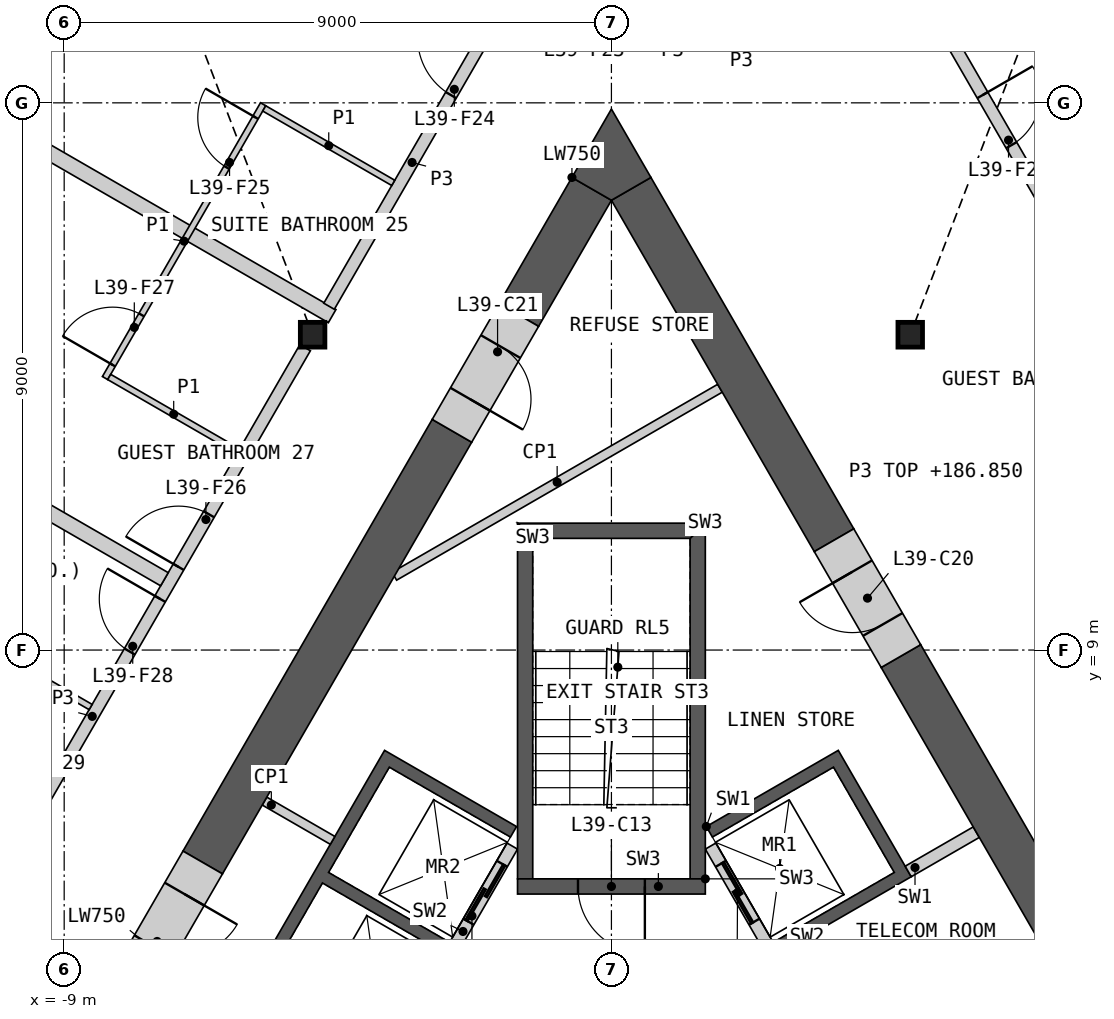
"""IFC4 building model, lengths in metres.
Left out: names, types, materials, properties, quantities, classifications, styles, units other than length and angle.
Written with IfcOpenShell. Run it as: python <this file> out.ifc"""

import sys

from ifc_helpers import new_model, si_unit, direction, frame, frame_2d, origin, origin_2d, place, context, subcontext, project, spatial, polyline, rectangle, i_section, outline, extrude, element, fill, save


model = new_model("IFC4")
c1 = context("Model", 3, precision=1e-05, world=origin(), true_north=direction((0.0, 1.0)))
c2 = subcontext(c1, "Body", "Model", "MODEL_VIEW")
j1 = project(units=[si_unit("LENGTHUNIT", "METRE"), si_unit("PLANEANGLEUNIT", "RADIAN")], contexts=[c1])
p1 = place(None, origin())
s1 = spatial("IfcSite", under=j1, at=p1, CompositionType="ELEMENT")
p2 = place(p1, origin())
s2 = spatial("IfcBuilding", under=s1, at=p2, CompositionType="ELEMENT")
p3 = place(p2, frame((0.0, 0.0, 183.6)))
s3 = spatial("IfcBuildingStorey", under=s2, at=p3, CompositionType="ELEMENT", Elevation=183.6)
for number, where, z_axis, x_axis in (
    (1, (-4.914, 14.186, 0.0), (0.0, 0.0, 1.0), (1.0, 0.0, 0.0)),
    (2, (4.914, 14.186, 0.0), (0.0, 0.0, 1.0), (1.0, 0.0, 0.0)),
):
    element("IfcColumn", number, at=place(p3, frame(where, z_axis=z_axis, x_axis=x_axis)), inside=s3, PredefinedType="COLUMN", context=c2, shape_type="SweptSolid", body=[
        extrude(i_section(OverallWidth=0.404, OverallDepth=0.407, WebThickness=0.027, FlangeThickness=0.044, at=origin_2d()), origin(), (0.0, 0.0, 1.0), 3.6),
    ])
p4 = place(p3, origin())
e3 = element("IfcWall", 3, at=p4, inside=s3, PredefinedType="SHEAR", context=c2, shape_type="SweptSolid", body=[
    extrude(outline(polyline([(1.561, 6.097), (3.731, 7.35), (4.931, 5.272), (2.76, 4.019), (2.66, 4.192), (4.652, 5.342), (3.652, 7.074), (1.66, 5.924), (1.561, 6.097)])), origin(), (0.0, 0.0, 1.0), 3.25),
])
p5 = place(p3, frame((5.817, -1.476, 0.0), z_axis=(0.0, 0.0, 1.0), x_axis=(-0.500002616675, 0.866023893041, 0.0)))
e4 = element("IfcWall", 4, at=p5, inside=s3, PredefinedType="SOLIDWALL", context=c2, shape_type="SweptSolid", body=[
    extrude(rectangle(XDim=8.373, YDim=0.2, at=frame_2d((4.187, 0.0))), origin(), (0.0, 0.0, 1.0), 3.25),
])
p6 = place(p5, frame((1.537, 0.0, 0.0)))
e5 = element("IfcOpeningElement", 5, at=p6, cuts=e4, PredefinedType="OPENING", context=c2, shape_type="SweptSolid", body=[
    extrude(rectangle(XDim=0.9, YDim=2.1, at=frame_2d((0.45, 1.05))), frame((0.0, 0.11, 0.0), z_axis=(0.0, -1.0, 0.0), x_axis=(1.0, 0.0, 0.0)), (0.0, 0.0, 1.0), 0.22),
])
p7 = place(p5, frame((4.837, 0.0, 0.0)))
e6 = element("IfcOpeningElement", 6, at=p7, cuts=e4, PredefinedType="OPENING", context=c2, shape_type="SweptSolid", body=[
    extrude(rectangle(XDim=0.9, YDim=2.1, at=frame_2d((0.45, 1.05))), frame((0.0, 0.11, 0.0), z_axis=(0.0, -1.0, 0.0), x_axis=(1.0, 0.0, 0.0)), (0.0, 0.0, 1.0), 0.22),
])
p8 = place(p5, frame((6.937, 0.0, 0.0)))
e7 = element("IfcOpeningElement", 7, at=p8, cuts=e4, PredefinedType="OPENING", context=c2, shape_type="SweptSolid", body=[
    extrude(rectangle(XDim=1.1, YDim=2.1, at=frame_2d((0.55, 1.05))), frame((0.0, 0.11, 0.0), z_axis=(0.0, -1.0, 0.0), x_axis=(1.0, 0.0, 0.0)), (0.0, 0.0, 1.0), 0.22),
])
p9 = place(p3, frame((4.881, 5.358, 0.0), z_axis=(0.0, 0.0, 1.0), x_axis=(0.866084958089, 0.499896834728, 0.0)))
e8 = element("IfcWall", 8, at=p9, inside=s3, PredefinedType="SHEAR", context=c2, shape_type="SweptSolid", body=[
    extrude(rectangle(XDim=1.293, YDim=0.2, at=frame_2d((0.646, 0.0))), origin(), (0.0, 0.0, 1.0), 3.25),
])
p10 = place(p3, origin())
e9 = element("IfcWall", 9, at=p10, inside=s3, PredefinedType="SHEAR", context=c2, shape_type="SweptSolid", body=[
    extrude(outline(polyline([(-4.96, 0.208), (-7.131, 1.461), (-3.731, 7.35), (-1.561, 6.097), (-1.66, 5.924), (-3.652, 7.074), (-4.652, 5.342), (-2.66, 4.192), (-2.76, 4.019), (-4.752, 5.169), (-5.752, 3.437), (-3.76, 2.287), (-3.861, 2.113), (-5.852, 3.263), (-6.852, 1.531), (-4.861, 0.381), (-4.96, 0.208)])), origin(), (0.0, 0.0, 1.0), 3.25),
])
p11 = place(p3, frame((-1.631, 5.776, 0.0), z_axis=(0.0, 0.0, 1.0), x_axis=(-0.499992876559, -0.866029516466, 0.0)))
e10 = element("IfcWall", 10, at=p11, inside=s3, PredefinedType="SOLIDWALL", context=c2, shape_type="SweptSolid", body=[
    extrude(rectangle(XDim=6.486, YDim=0.2, at=frame_2d((3.243, 0.0))), origin(), (0.0, 0.0, 1.0), 3.25),
])
p12 = place(p11, frame((0.337, 0.0, 0.0)))
e11 = element("IfcOpeningElement", 11, at=p12, cuts=e10, PredefinedType="OPENING", context=c2, shape_type="SweptSolid", body=[
    extrude(rectangle(XDim=1.1, YDim=2.1, at=frame_2d((0.55, 1.05))), frame((0.0, 0.11, 0.0), z_axis=(0.0, -1.0, 0.0), x_axis=(1.0, 0.0, 0.0)), (0.0, 0.0, 1.0), 0.22),
])
p13 = place(p11, frame((2.537, 0.0, 0.0)))
e12 = element("IfcOpeningElement", 12, at=p13, cuts=e10, PredefinedType="OPENING", context=c2, shape_type="SweptSolid", body=[
    extrude(rectangle(XDim=1.1, YDim=2.1, at=frame_2d((0.55, 1.05))), frame((0.0, 0.11, 0.0), z_axis=(0.0, -1.0, 0.0), x_axis=(1.0, 0.0, 0.0)), (0.0, 0.0, 1.0), 0.22),
])
p14 = place(p3, origin())
e13 = element("IfcWall", 13, at=p14, inside=s3, PredefinedType="SHEAR", context=c2, shape_type="SweptSolid", body=[
    extrude(outline(polyline([(1.544, 5.237), (1.544, 11.087), (1.294, 10.837), (1.294, 5.237), (1.544, 5.237)])), origin(), (0.0, 0.0, 1.0), 3.25),
])
p15 = place(p3, origin())
e14 = element("IfcWall", 14, at=p15, inside=s3, PredefinedType="SHEAR", context=c2, shape_type="SweptSolid", body=[
    extrude(outline(polyline([(1.544, 11.087), (-1.544, 11.087), (-1.294, 10.837), (1.294, 10.837), (1.544, 11.087)])), origin(), (0.0, 0.0, 1.0), 3.25),
])
p16 = place(p3, origin())
e15 = element("IfcWall", 15, at=p16, inside=s3, PredefinedType="SHEAR", context=c2, shape_type="SweptSolid", body=[
    extrude(outline(polyline([(-1.294, 10.837), (-1.544, 11.087), (-1.544, 5.237), (-1.294, 5.237), (-1.294, 10.837)])), origin(), (0.0, 0.0, 1.0), 3.25),
])
p17 = place(p3, frame((1.544, 5.112, 0.0), z_axis=(0.0, 0.0, 1.0), x_axis=(-1.0, 0.0, 0.0)))
e16 = element("IfcWall", 16, at=p17, inside=s3, PredefinedType="SHEAR", context=c2, shape_type="SweptSolid", body=[
    extrude(rectangle(XDim=3.088, YDim=0.25, at=frame_2d((1.544, 0.0))), origin(), (0.0, 0.0, 1.0), 3.25),
])
p18 = place(p17, frame((0.994, 0.0, 0.0)))
e17 = element("IfcOpeningElement", 17, at=p18, cuts=e16, PredefinedType="OPENING", context=c2, shape_type="SweptSolid", body=[
    extrude(rectangle(XDim=1.1, YDim=2.1, at=frame_2d((0.55, 1.05))), frame((0.0, 0.135, 0.0), z_axis=(0.0, -1.0, 0.0), x_axis=(1.0, 0.0, 0.0)), (0.0, 0.0, 1.0), 0.27),
])
p19 = place(p3, frame((-5.705, 6.516, 0.0), z_axis=(0.0, 0.0, 1.0), x_axis=(0.866003189247, -0.500038474733, 0.0)))
e18 = element("IfcWall", 18, at=p19, inside=s3, PredefinedType="PARTITIONING", context=c2, shape_type="SweptSolid", body=[
    extrude(rectangle(XDim=1.293, YDim=0.15, at=frame_2d((0.646, 0.0))), origin(), (0.0, 0.0, 1.0), 3.25),
])
p20 = place(p3, frame((1.785, 13.306, 0.0), z_axis=(0.0, 0.0, 1.0), x_axis=(-0.866038319186, -0.499977629202, 0.0)))
e19 = element("IfcWall", 19, at=p20, inside=s3, PredefinedType="PARTITIONING", context=c2, shape_type="SweptSolid", body=[
    extrude(rectangle(XDim=6.184, YDim=0.15, at=frame_2d((3.092, 0.0))), origin(), (0.0, 0.0, 1.0), 3.25),
])
p21 = place(p3, frame((3.661, 10.806, 0.0), z_axis=(0.0, 0.0, 1.0), x_axis=(-0.500014865866, 0.866016820803, 0.0)))
e20 = element("IfcWall", 20, at=p21, inside=s3, PredefinedType="SHEAR", context=c2, shape_type="SweptSolid", body=[
    extrude(rectangle(XDim=6.673, YDim=0.75, at=frame_2d((3.336, 0.0))), origin(), (0.0, 0.0, 1.0), 3.25),
])
p22 = place(p3, frame((7.964, 3.354, 0.0), z_axis=(0.0, 0.0, 1.0), x_axis=(-0.50002928721, 0.866008494146, 0.0)))
e21 = element("IfcWall", 21, at=p22, inside=s3, PredefinedType="SHEAR", context=c2, shape_type="SweptSolid", body=[
    extrude(rectangle(XDim=6.405, YDim=0.75, at=frame_2d((3.203, 0.0))), origin(), (0.0, 0.0, 1.0), 3.25),
])
p23 = place(p3, frame((-2.622, 12.606, 0.0), z_axis=(0.0, 0.0, 1.0), x_axis=(-0.500014611105, -0.866016967894, 0.0)))
e22 = element("IfcWall", 22, at=p23, inside=s3, PredefinedType="SHEAR", context=c2, shape_type="SweptSolid", body=[
    extrude(rectangle(XDim=8.198, YDim=0.75, at=frame_2d((4.099, 0.0))), origin(), (0.0, 0.0, 1.0), 3.25),
])
p24 = place(p3, frame((-0.325, 16.585, 0.0), z_axis=(0.0, 0.0, 1.0), x_axis=(-0.500019473932, -0.866014160212, 0.0)))
e23 = element("IfcWall", 23, at=p24, inside=s3, PredefinedType="SHEAR", context=c2, shape_type="SweptSolid", body=[
    extrude(rectangle(XDim=2.396, YDim=0.75, at=frame_2d((1.198, 0.0))), origin(), (0.0, 0.0, 1.0), 3.25),
])
p25 = place(p3, origin())
e24 = element("IfcWall", 24, at=p25, inside=s3, PredefinedType="SHEAR", context=c2, shape_type="SweptSolid", body=[
    extrude(outline(polyline([(-0.649, 16.773), (0.0, 17.898), (0.649, 16.773), (0.0, 16.398), (-0.649, 16.773)])), origin(), (0.0, 0.0, 1.0), 3.25),
])
p26 = place(p3, frame((-6.721, 5.506, 0.0), z_axis=(0.0, 0.0, 1.0), x_axis=(-0.499946605688, -0.86605622881, 0.0)))
e25 = element("IfcWall", 25, at=p26, inside=s3, PredefinedType="SHEAR", context=c2, shape_type="SweptSolid", body=[
    extrude(rectangle(XDim=2.2, YDim=0.75, at=frame_2d((1.1, 0.0))), origin(), (0.0, 0.0, 1.0), 3.25),
])
p27 = place(p26, frame((0.6, 0.0, 0.0)))
e26 = element("IfcOpeningElement", 26, at=p27, cuts=e25, PredefinedType="OPENING", context=c2, shape_type="SweptSolid", body=[
    extrude(rectangle(XDim=1.0, YDim=2.1, at=frame_2d((0.5, 1.05))), frame((0.0, 0.385, 0.0), z_axis=(0.0, -1.0, 0.0), x_axis=(1.0, 0.0, 0.0)), (0.0, 0.0, 1.0), 0.77),
])
p28 = place(p3, frame((4.761, 8.901, 0.0), z_axis=(0.0, 0.0, 1.0), x_axis=(-0.499898558967, 0.866083962871, 0.0)))
e27 = element("IfcWall", 27, at=p28, inside=s3, PredefinedType="SHEAR", context=c2, shape_type="SweptSolid", body=[
    extrude(rectangle(XDim=2.2, YDim=0.75, at=frame_2d((1.1, 0.0))), origin(), (0.0, 0.0, 1.0), 3.25),
])
p29 = place(p28, frame((0.6, 0.0, 0.0)))
e28 = element("IfcOpeningElement", 28, at=p29, cuts=e27, PredefinedType="OPENING", context=c2, shape_type="SweptSolid", body=[
    extrude(rectangle(XDim=1.0, YDim=2.1, at=frame_2d((0.5, 1.05))), frame((0.0, 0.385, 0.0), z_axis=(0.0, -1.0, 0.0), x_axis=(1.0, 0.0, 0.0)), (0.0, 0.0, 1.0), 0.77),
])
p30 = place(p3, frame((-1.522, 14.511, 0.0), z_axis=(0.0, 0.0, 1.0), x_axis=(-0.499946605688, -0.86605622881, 0.0)))
e29 = element("IfcWall", 29, at=p30, inside=s3, PredefinedType="SHEAR", context=c2, shape_type="SweptSolid", body=[
    extrude(rectangle(XDim=2.2, YDim=0.75, at=frame_2d((1.1, 0.0))), origin(), (0.0, 0.0, 1.0), 3.25),
])
p31 = place(p30, frame((0.6, 0.0, 0.0)))
e30 = element("IfcOpeningElement", 30, at=p31, cuts=e29, PredefinedType="OPENING", context=c2, shape_type="SweptSolid", body=[
    extrude(rectangle(XDim=1.0, YDim=2.1, at=frame_2d((0.5, 1.05))), frame((0.0, 0.385, 0.0), z_axis=(0.0, -1.0, 0.0), x_axis=(1.0, 0.0, 0.0)), (0.0, 0.0, 1.0), 0.77),
])
p32 = place(p3, frame((5.377, 19.385, 0.0), z_axis=(0.0, 0.0, 1.0), x_axis=(0.500000757641, -0.86602496636, 0.0)))
e31 = element("IfcWall", 31, at=p32, inside=s3, PredefinedType="PARTITIONING", context=c2, shape_type="SweptSolid", body=[
    extrude(rectangle(XDim=28.198, YDim=0.2, at=frame_2d((14.099, 0.0))), origin(), (0.0, 0.0, 1.0), 3.25),
])
p33 = place(p32, frame((22.735, 0.0, 0.0)))
e32 = element("IfcOpeningElement", 32, at=p33, cuts=e31, PredefinedType="OPENING", context=c2, shape_type="SweptSolid", body=[
    extrude(rectangle(XDim=1.8, YDim=2.1, at=frame_2d((0.9, 1.05))), frame((0.0, 0.11, 0.0), z_axis=(0.0, -1.0, 0.0), x_axis=(1.0, 0.0, 0.0)), (0.0, 0.0, 1.0), 0.22),
])
p34 = place(p32, frame((14.402, 0.0, 0.0)))
e33 = element("IfcOpeningElement", 33, at=p34, cuts=e31, PredefinedType="OPENING", context=c2, shape_type="SweptSolid", body=[
    extrude(rectangle(XDim=1.0, YDim=2.1, at=frame_2d((0.5, 1.05))), frame((0.0, 0.11, 0.0), z_axis=(0.0, -1.0, 0.0), x_axis=(1.0, 0.0, 0.0)), (0.0, 0.0, 1.0), 0.22),
])
p35 = place(p32, frame((12.796, 0.0, 0.0)))
e34 = element("IfcOpeningElement", 34, at=p35, cuts=e31, PredefinedType="OPENING", context=c2, shape_type="SweptSolid", body=[
    extrude(rectangle(XDim=1.0, YDim=2.1, at=frame_2d((0.5, 1.05))), frame((0.0, 0.11, 0.0), z_axis=(0.0, -1.0, 0.0), x_axis=(1.0, 0.0, 0.0)), (0.0, 0.0, 1.0), 0.22),
])
p36 = place(p32, frame((4.164, 0.0, 0.0)))
e35 = element("IfcOpeningElement", 35, at=p36, cuts=e31, PredefinedType="OPENING", context=c2, shape_type="SweptSolid", body=[
    extrude(rectangle(XDim=1.0, YDim=2.1, at=frame_2d((0.5, 1.05))), frame((0.0, 0.11, 0.0), z_axis=(0.0, -1.0, 0.0), x_axis=(1.0, 0.0, 0.0)), (0.0, 0.0, 1.0), 0.22),
])
p37 = place(p32, frame((1.452, 0.0, 0.0)))
e36 = element("IfcOpeningElement", 36, at=p37, cuts=e31, PredefinedType="OPENING", context=c2, shape_type="SweptSolid", body=[
    extrude(rectangle(XDim=0.95, YDim=2.1, at=frame_2d((0.475, 1.05))), frame((0.0, 0.11, 0.0), z_axis=(0.0, -1.0, 0.0), x_axis=(1.0, 0.0, 0.0)), (0.0, 0.0, 1.0), 0.22),
])
p38 = place(p3, frame((-15.835, 20.983, 0.0), z_axis=(0.0, 0.0, 1.0), x_axis=(0.866022720283, -0.500004647933, 0.0)))
e37 = element("IfcWall", 37, at=p38, inside=s3, PredefinedType="PARTITIONING", context=c2, shape_type="SweptSolid", body=[
    extrude(rectangle(XDim=12.981, YDim=0.25, at=frame_2d((6.49, 0.0))), origin(), (0.0, 0.0, 1.0), 2.404),
])
p39 = place(p3, frame((-9.705, 5.888, 0.0), z_axis=(0.0, 0.0, 1.0), x_axis=(0.50000393355, 0.866023132736, 0.0)))
e38 = element("IfcWall", 38, at=p39, inside=s3, PredefinedType="PARTITIONING", context=c2, shape_type="SweptSolid", body=[
    extrude(rectangle(XDim=9.335, YDim=0.2, at=frame_2d((4.667, 0.0))), origin(), (0.0, 0.0, 1.0), 3.25),
])
p40 = place(p39, frame((5.172, 0.0, 0.0)))
e39 = element("IfcOpeningElement", 39, at=p40, cuts=e38, PredefinedType="OPENING", context=c2, shape_type="SweptSolid", body=[
    extrude(rectangle(XDim=1.0, YDim=2.1, at=frame_2d((0.5, 1.05))), frame((0.0, 0.11, 0.0), z_axis=(0.0, -1.0, 0.0), x_axis=(1.0, 0.0, 0.0)), (0.0, 0.0, 1.0), 0.22),
])
p41 = place(p39, frame((3.565, 0.0, 0.0)))
e40 = element("IfcOpeningElement", 40, at=p41, cuts=e38, PredefinedType="OPENING", context=c2, shape_type="SweptSolid", body=[
    extrude(rectangle(XDim=1.0, YDim=2.1, at=frame_2d((0.5, 1.05))), frame((0.0, 0.11, 0.0), z_axis=(0.0, -1.0, 0.0), x_axis=(1.0, 0.0, 0.0)), (0.0, 0.0, 1.0), 0.22),
])
p42 = place(p3, frame((-14.39, 14.228, 0.0), z_axis=(0.0, 0.0, 1.0), x_axis=(0.866031008936, -0.499990291468, 0.0)))
e41 = element("IfcWall", 41, at=p42, inside=s3, PredefinedType="PARTITIONING", context=c2, shape_type="SweptSolid", body=[
    extrude(rectangle(XDim=8.127, YDim=0.25, at=frame_2d((4.063, 0.0))), origin(), (0.0, 0.0, 1.0), 2.404),
])
p43 = place(p3, frame((-4.644, 14.655, 0.0), z_axis=(0.0, 0.0, 1.0), x_axis=(0.49998041698, 0.866036709751, 0.0)))
e42 = element("IfcWall", 42, at=p43, inside=s3, PredefinedType="PARTITIONING", context=c2, shape_type="SweptSolid", body=[
    extrude(rectangle(XDim=5.462, YDim=0.2, at=frame_2d((2.731, 0.0))), origin(), (0.0, 0.0, 1.0), 3.25),
])
p44 = place(p43, frame((4.01, 0.0, 0.0)))
e43 = element("IfcOpeningElement", 43, at=p44, cuts=e42, PredefinedType="OPENING", context=c2, shape_type="SweptSolid", body=[
    extrude(rectangle(XDim=1.1, YDim=2.1, at=frame_2d((0.55, 1.05))), frame((0.0, 0.11, 0.0), z_axis=(0.0, -1.0, 0.0), x_axis=(1.0, 0.0, 0.0)), (0.0, 0.0, 1.0), 0.22),
])
p45 = place(p3, frame((-8.328, 13.473, 0.0), z_axis=(0.0, 0.0, 1.0), x_axis=(0.499992051641, 0.866029992723, 0.0)))
e44 = element("IfcWall", 44, at=p45, inside=s3, PredefinedType="PARTITIONING", context=c2, shape_type="SweptSolid", body=[
    extrude(rectangle(XDim=5.2, YDim=0.1, at=frame_2d((2.6, 0.0))), origin(), (0.0, 0.0, 1.0), 2.404),
])
p46 = place(p45, frame((4.0, 0.0, 0.0)))
e45 = element("IfcOpeningElement", 45, at=p46, cuts=e44, PredefinedType="OPENING", context=c2, shape_type="SweptSolid", body=[
    extrude(rectangle(XDim=0.95, YDim=2.1, at=frame_2d((0.475, 1.05))), frame((0.0, 0.06, 0.0), z_axis=(0.0, -1.0, 0.0), x_axis=(1.0, 0.0, 0.0)), (0.0, 0.0, 1.0), 0.12),
])
p47 = place(p45, frame((0.25, 0.0, 0.0)))
e46 = element("IfcOpeningElement", 46, at=p47, cuts=e44, PredefinedType="OPENING", context=c2, shape_type="SweptSolid", body=[
    extrude(rectangle(XDim=0.95, YDim=2.1, at=frame_2d((0.475, 1.05))), frame((0.0, 0.06, 0.0), z_axis=(0.0, -1.0, 0.0), x_axis=(1.0, 0.0, 0.0)), (0.0, 0.0, 1.0), 0.12),
])
p48 = place(p3, frame((-5.71, 17.908, 0.0), z_axis=(0.0, 0.0, 1.0), x_axis=(0.866057815567, -0.499943856944, 0.0)))
e47 = element("IfcWall", 47, at=p48, inside=s3, PredefinedType="PARTITIONING", context=c2, shape_type="SweptSolid", body=[
    extrude(rectangle(XDim=2.45, YDim=0.1, at=frame_2d((1.225, 0.0))), origin(), (0.0, 0.0, 1.0), 2.404),
])
p49 = place(p3, frame((-8.26, 13.492, 0.0), z_axis=(0.0, 0.0, 1.0), x_axis=(0.866014668023, -0.500018594424, 0.0)))
e48 = element("IfcWall", 48, at=p49, inside=s3, PredefinedType="PARTITIONING", context=c2, shape_type="SweptSolid", body=[
    extrude(rectangle(XDim=2.45, YDim=0.1, at=frame_2d((1.225, 0.0))), origin(), (0.0, 0.0, 1.0), 2.404),
])
p50 = place(p3, frame((-10.687, 9.288, 0.0), z_axis=(0.0, 0.0, 1.0), x_axis=(0.866032905446, -0.499987006516, 0.0)))
e49 = element("IfcWall", 49, at=p50, inside=s3, PredefinedType="PARTITIONING", context=c2, shape_type="SweptSolid", body=[
    extrude(rectangle(XDim=2.45, YDim=0.1, at=frame_2d((1.225, 0.0))), origin(), (0.0, 0.0, 1.0), 2.404),
])
p51 = place(p8, origin())
e50 = element("IfcDoor", 50, at=p51, inside=s3, OperationType="SLIDING_TO_LEFT", PredefinedType="DOOR", context=c2, shape_type="SweptSolid", body=[
    extrude(rectangle(XDim=1.1, YDim=2.1, at=frame_2d((0.55, 1.05))), frame((0.0, 0.025, 0.0), z_axis=(0.0, -1.0, 0.0), x_axis=(1.0, 0.0, 0.0)), (0.0, 0.0, 1.0), 0.05),
])
fill(e7, e50)
p52 = place(p12, origin())
e51 = element("IfcDoor", 51, at=p52, inside=s3, OperationType="SLIDING_TO_LEFT", PredefinedType="DOOR", context=c2, shape_type="SweptSolid", body=[
    extrude(rectangle(XDim=1.1, YDim=2.1, at=frame_2d((0.55, 1.05))), frame((0.0, 0.025, 0.0), z_axis=(0.0, -1.0, 0.0), x_axis=(1.0, 0.0, 0.0)), (0.0, 0.0, 1.0), 0.05),
])
fill(e11, e51)
p53 = place(p18, origin())
e52 = element("IfcDoor", 52, at=p53, inside=s3, OperationType="SINGLE_SWING_LEFT", PredefinedType="DOOR", context=c2, shape_type="SweptSolid", body=[
    extrude(rectangle(XDim=1.1, YDim=2.1, at=frame_2d((0.55, 1.05))), frame((0.0, 0.025, 0.0), z_axis=(0.0, -1.0, 0.0), x_axis=(1.0, 0.0, 0.0)), (0.0, 0.0, 1.0), 0.05),
])
fill(e17, e52)
p54 = place(p27, origin())
e53 = element("IfcDoor", 53, at=p54, inside=s3, OperationType="SINGLE_SWING_LEFT", PredefinedType="DOOR", context=c2, shape_type="SweptSolid", body=[
    extrude(rectangle(XDim=1.0, YDim=2.1, at=frame_2d((0.5, 1.05))), frame((0.0, 0.13, 0.0), z_axis=(0.0, -1.0, 0.0), x_axis=(1.0, 0.0, 0.0)), (0.0, 0.0, 1.0), 0.05),
])
fill(e26, e53)
p55 = place(p29, origin())
e54 = element("IfcDoor", 54, at=p55, inside=s3, OperationType="SINGLE_SWING_RIGHT", PredefinedType="DOOR", context=c2, shape_type="SweptSolid", body=[
    extrude(rectangle(XDim=1.0, YDim=2.1, at=frame_2d((0.5, 1.05))), frame((0.0, 0.13, 0.0), z_axis=(0.0, -1.0, 0.0), x_axis=(1.0, 0.0, 0.0)), (0.0, 0.0, 1.0), 0.05),
])
fill(e28, e54)
p56 = place(p31, origin())
e55 = element("IfcDoor", 55, at=p56, inside=s3, OperationType="SINGLE_SWING_RIGHT", PredefinedType="DOOR", context=c2, shape_type="SweptSolid", body=[
    extrude(rectangle(XDim=1.0, YDim=2.1, at=frame_2d((0.5, 1.05))), frame((0.0, 0.13, 0.0), z_axis=(0.0, -1.0, 0.0), x_axis=(1.0, 0.0, 0.0)), (0.0, 0.0, 1.0), 0.05),
])
fill(e30, e55)
p57 = place(p37, origin())
e56 = element("IfcDoor", 56, at=p57, inside=s3, OperationType="SINGLE_SWING_LEFT", PredefinedType="DOOR", context=c2, shape_type="SweptSolid", body=[
    extrude(rectangle(XDim=0.95, YDim=2.1, at=frame_2d((0.475, 1.05))), frame((0.0, 0.025, 0.0), z_axis=(0.0, -1.0, 0.0), x_axis=(1.0, 0.0, 0.0)), (0.0, 0.0, 1.0), 0.05),
])
fill(e36, e56)
p58 = place(p44, origin())
e57 = element("IfcDoor", 57, at=p58, inside=s3, OperationType="SINGLE_SWING_RIGHT", PredefinedType="DOOR", context=c2, shape_type="SweptSolid", body=[
    extrude(rectangle(XDim=1.1, YDim=2.1, at=frame_2d((0.55, 1.05))), frame((0.0, 0.025, 0.0), z_axis=(0.0, -1.0, 0.0), x_axis=(1.0, 0.0, 0.0)), (0.0, 0.0, 1.0), 0.05),
])
fill(e43, e57)
p59 = place(p46, origin())
e58 = element("IfcDoor", 58, at=p59, inside=s3, OperationType="SINGLE_SWING_RIGHT", PredefinedType="DOOR", context=c2, shape_type="SweptSolid", body=[
    extrude(rectangle(XDim=0.95, YDim=2.1, at=frame_2d((0.475, 1.05))), frame((0.0, 0.025, 0.0), z_axis=(0.0, -1.0, 0.0), x_axis=(1.0, 0.0, 0.0)), (0.0, 0.0, 1.0), 0.05),
])
fill(e45, e58)
p60 = place(p40, origin())
e59 = element("IfcDoor", 59, at=p60, inside=s3, OperationType="SINGLE_SWING_LEFT", PredefinedType="DOOR", context=c2, shape_type="SweptSolid", body=[
    extrude(rectangle(XDim=1.0, YDim=2.1, at=frame_2d((0.5, 1.05))), frame((0.0, 0.025, 0.0), z_axis=(0.0, -1.0, 0.0), x_axis=(1.0, 0.0, 0.0)), (0.0, 0.0, 1.0), 0.05),
])
fill(e39, e59)
p61 = place(p47, origin())
e60 = element("IfcDoor", 60, at=p61, inside=s3, OperationType="SINGLE_SWING_LEFT", PredefinedType="DOOR", context=c2, shape_type="SweptSolid", body=[
    extrude(rectangle(XDim=0.95, YDim=2.1, at=frame_2d((0.475, 1.05))), frame((0.0, 0.025, 0.0), z_axis=(0.0, -1.0, 0.0), x_axis=(1.0, 0.0, 0.0)), (0.0, 0.0, 1.0), 0.05),
])
fill(e46, e60)
p62 = place(p41, origin())
e61 = element("IfcDoor", 61, at=p62, inside=s3, OperationType="SINGLE_SWING_RIGHT", PredefinedType="DOOR", context=c2, shape_type="SweptSolid", body=[
    extrude(rectangle(XDim=1.0, YDim=2.1, at=frame_2d((0.5, 1.05))), frame((0.0, 0.025, 0.0), z_axis=(0.0, -1.0, 0.0), x_axis=(1.0, 0.0, 0.0)), (0.0, 0.0, 1.0), 0.05),
])
fill(e40, e61)
save(model, sys.argv[1])
